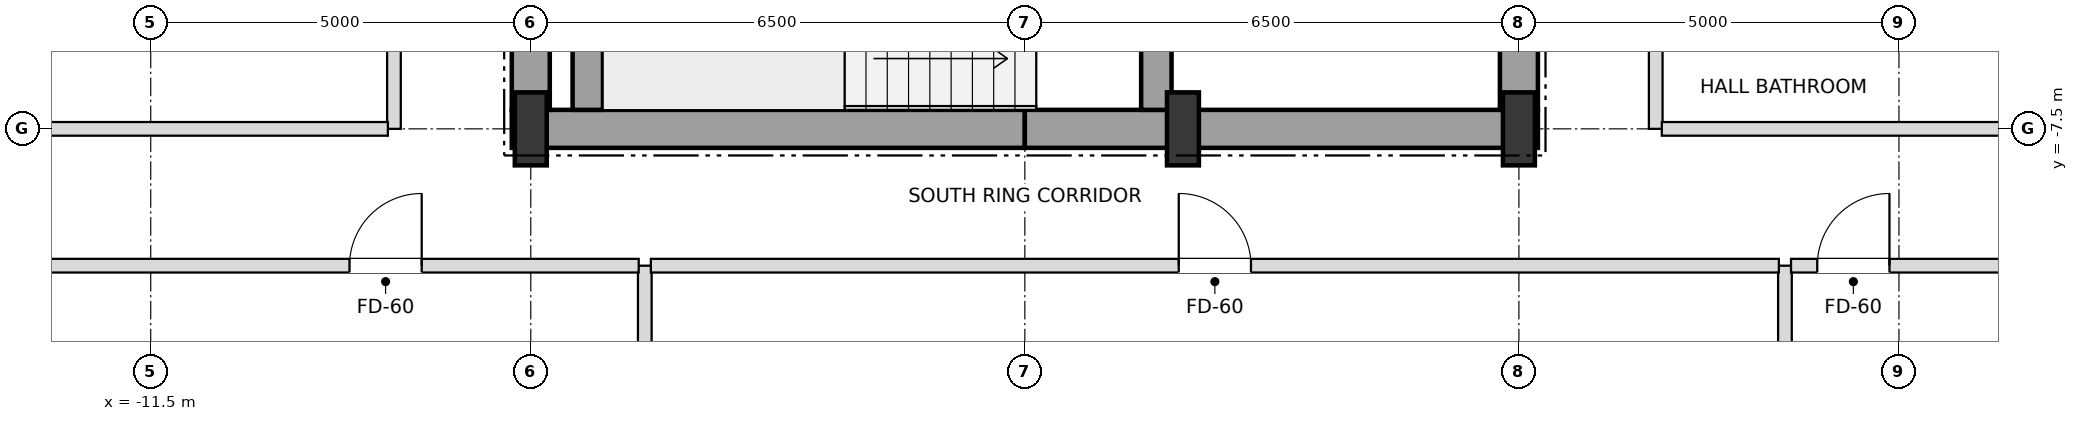
"""IFC4 building model, lengths in metres.
Left out: names, types, materials, properties, quantities, classifications, styles, units other than length and angle.
Written with IfcOpenShell. Run it as: python <this file> out.ifc"""

import sys

from ifc_helpers import new_model, si_unit, direction, frame, frame_2d, origin, origin_2d, place, context, subcontext, project, spatial, rectangle, i_section, extrude, element, fill, save


model = new_model("IFC4")
c1 = context("Model", 3, precision=1e-05, world=origin(), true_north=direction((0.0, 1.0)))
c2 = subcontext(c1, "Body", "Model", "MODEL_VIEW")
j1 = project(units=[si_unit("LENGTHUNIT", "METRE"), si_unit("PLANEANGLEUNIT", "RADIAN")], contexts=[c1])
p1 = place(None, origin())
s1 = spatial("IfcSite", under=j1, at=p1, CompositionType="ELEMENT")
p2 = place(p1, origin())
s2 = spatial("IfcBuilding", under=s1, at=p2, CompositionType="ELEMENT")
p3 = place(p2, frame((0.0, 0.0, 106.2)))
s3 = spatial("IfcBuildingStorey", under=s2, at=p3, CompositionType="ELEMENT", Elevation=106.2)
for number, where, z_axis, x_axis in (
    (1, (-6.5, -7.5, 0.0), (0.0, 0.0, 1.0), (1.0, 0.0, 0.0)),
    (2, (2.08, -7.5, 0.0), (0.0, 0.0, 1.0), (1.0, 0.0, 0.0)),
    (3, (6.5, -7.5, 0.0), (0.0, 0.0, 1.0), (1.0, 0.0, 0.0)),
):
    element("IfcColumn", number, at=place(p3, frame(where, z_axis=z_axis, x_axis=x_axis)), inside=s3, PredefinedType="COLUMN", context=c2, shape_type="SweptSolid", body=[
        extrude(i_section(OverallWidth=0.42, OverallDepth=0.96, WebThickness=0.022, FlangeThickness=0.034, at=origin_2d()), origin(), (0.0, 0.0, 1.0), 3.6),
    ])
for number, where, z_axis, x_axis in (
    (4, (-6.75, -7.5, 0.0), (0.0, 0.0, 1.0), (1.0, 0.0, 0.0)),
    (5, (0.0, -7.5, 0.0), (0.0, 0.0, 1.0), (1.0, 0.0, 0.0)),
):
    element("IfcWall", number, at=place(p3, frame(where, z_axis=z_axis, x_axis=x_axis)), inside=s3, PredefinedType="SHEAR", context=c2, shape_type="SweptSolid", body=[
        extrude(rectangle(XDim=6.75, YDim=0.5, at=frame_2d((3.375, 0.0))), origin(), (0.0, 0.0, 1.0), 3.38),
    ])
p4 = place(p3, frame((-6.5, -7.25, 0.0), z_axis=(0.0, 0.0, 1.0), x_axis=(0.0, 1.0, 0.0)))
e6 = element("IfcWall", 6, at=p4, inside=s3, PredefinedType="SHEAR", context=c2, shape_type="SweptSolid", body=[
    extrude(rectangle(XDim=3.55, YDim=0.5, at=frame_2d((1.775, 0.0))), origin(), (0.0, 0.0, 1.0), 3.38),
])
p5 = place(p3, frame((6.5, -7.25, 0.0), z_axis=(0.0, 0.0, 1.0), x_axis=(0.0, 1.0, 0.0)))
e7 = element("IfcWall", 7, at=p5, inside=s3, PredefinedType="SHEAR", context=c2, shape_type="SweptSolid", body=[
    extrude(rectangle(XDim=5.75, YDim=0.5, at=frame_2d((2.875, 0.0))), origin(), (0.0, 0.0, 1.0), 3.38),
])
p6 = place(p5, frame((0.85, 0.0, 0.0)))
e8 = element("IfcOpeningElement", 8, at=p6, cuts=e7, PredefinedType="OPENING", context=c2, shape_type="SweptSolid", body=[
    extrude(rectangle(XDim=1.05, YDim=2.15, at=frame_2d((0.525, 1.075))), frame((0.0, 0.26, 0.0), z_axis=(0.0, -1.0, 0.0), x_axis=(1.0, 0.0, 0.0)), (0.0, 0.0, 1.0), 0.52),
])
p7 = place(p3, frame((-5.75, -7.25, 0.0), z_axis=(0.0, 0.0, 1.0), x_axis=(0.0, 1.0, 0.0)))
e9 = element("IfcWall", 9, at=p7, inside=s3, PredefinedType="SHEAR", context=c2, shape_type="SweptSolid", body=[
    extrude(rectangle(XDim=2.9, YDim=0.4, at=frame_2d((1.45, 0.0))), origin(), (0.0, 0.0, 1.0), 3.38),
])
p8 = place(p3, frame((1.73, -7.25, 0.0), z_axis=(0.0, 0.0, 1.0), x_axis=(0.0, 1.0, 0.0)))
e10 = element("IfcWall", 10, at=p8, inside=s3, PredefinedType="SHEAR", context=c2, shape_type="SweptSolid", body=[
    extrude(rectangle(XDim=3.3, YDim=0.4, at=frame_2d((1.65, 0.0))), origin(), (0.0, 0.0, 1.0), 3.38),
])
p9 = place(p8, frame((0.9, 0.0, 0.0)))
e11 = element("IfcOpeningElement", 11, at=p9, cuts=e10, PredefinedType="OPENING", context=c2, shape_type="SweptSolid", body=[
    extrude(rectangle(XDim=1.05, YDim=2.15, at=frame_2d((0.525, 1.075))), frame((0.0, 0.21, 0.0), z_axis=(0.0, -1.0, 0.0), x_axis=(1.0, 0.0, 0.0)), (0.0, 0.0, 1.0), 0.42),
])
p10 = place(p3, frame((-8.3, -7.5, 0.0), z_axis=(0.0, 0.0, 1.0), x_axis=(0.0, 1.0, 0.0)))
e12 = element("IfcWall", 12, at=p10, inside=s3, PredefinedType="PARTITIONING", context=c2, shape_type="SweptSolid", body=[
    extrude(rectangle(XDim=15.0, YDim=0.18, at=frame_2d((7.5, 0.0))), origin(), (0.0, 0.0, 1.0), 3.38),
])
p11 = place(p10, frame((2.075, 0.0, 0.0)))
e13 = element("IfcOpeningElement", 13, at=p11, cuts=e12, PredefinedType="OPENING", context=c2, shape_type="SweptSolid", body=[
    extrude(rectangle(XDim=0.95, YDim=2.15, at=frame_2d((0.475, 1.075))), frame((0.0, 0.1, 0.0), z_axis=(0.0, -1.0, 0.0), x_axis=(1.0, 0.0, 0.0)), (0.0, 0.0, 1.0), 0.2),
])
p12 = place(p10, frame((8.475, 0.0, 0.0)))
e14 = element("IfcOpeningElement", 14, at=p12, cuts=e12, PredefinedType="OPENING", context=c2, shape_type="SweptSolid", body=[
    extrude(rectangle(XDim=0.95, YDim=2.15, at=frame_2d((0.475, 1.075))), frame((0.0, 0.1, 0.0), z_axis=(0.0, -1.0, 0.0), x_axis=(1.0, 0.0, 0.0)), (0.0, 0.0, 1.0), 0.2),
])
p13 = place(p10, frame((13.425, 0.0, 0.0)))
e15 = element("IfcOpeningElement", 15, at=p13, cuts=e12, PredefinedType="OPENING", context=c2, shape_type="SweptSolid", body=[
    extrude(rectangle(XDim=0.95, YDim=2.15, at=frame_2d((0.475, 1.075))), frame((0.0, 0.1, 0.0), z_axis=(0.0, -1.0, 0.0), x_axis=(1.0, 0.0, 0.0)), (0.0, 0.0, 1.0), 0.2),
])
p14 = place(p3, frame((-5.0, -23.15, 0.0), z_axis=(0.0, 0.0, 1.0), x_axis=(0.0, 1.0, 0.0)))
e16 = element("IfcWall", 16, at=p14, inside=s3, PredefinedType="PARTITIONING", context=c2, shape_type="SweptSolid", body=[
    extrude(rectangle(XDim=13.85, YDim=0.18, at=frame_2d((6.925, 0.0))), origin(), (0.0, 0.0, 1.0), 2.816),
])
p15 = place(p3, frame((8.3, -7.5, 0.0), z_axis=(0.0, 0.0, 1.0), x_axis=(0.0, 1.0, 0.0)))
e17 = element("IfcWall", 17, at=p15, inside=s3, PredefinedType="PARTITIONING", context=c2, shape_type="SweptSolid", body=[
    extrude(rectangle(XDim=15.0, YDim=0.18, at=frame_2d((7.5, 0.0))), origin(), (0.0, 0.0, 1.0), 3.38),
])
p16 = place(p15, frame((3.475, 0.0, 0.0)))
e18 = element("IfcOpeningElement", 18, at=p16, cuts=e17, PredefinedType="OPENING", context=c2, shape_type="SweptSolid", body=[
    extrude(rectangle(XDim=0.95, YDim=2.15, at=frame_2d((0.475, 1.075))), frame((0.0, 0.1, 0.0), z_axis=(0.0, -1.0, 0.0), x_axis=(1.0, 0.0, 0.0)), (0.0, 0.0, 1.0), 0.2),
])
p17 = place(p3, frame((10.0, -23.15, 0.0), z_axis=(0.0, 0.0, 1.0), x_axis=(0.0, 1.0, 0.0)))
e19 = element("IfcWall", 19, at=p17, inside=s3, PredefinedType="PARTITIONING", context=c2, shape_type="SweptSolid", body=[
    extrude(rectangle(XDim=13.85, YDim=0.18, at=frame_2d((6.925, 0.0))), origin(), (0.0, 0.0, 1.0), 2.816),
])
p18 = place(p17, frame((4.855, 0.0, 0.0)))
e20 = element("IfcOpeningElement", 20, at=p18, cuts=e19, PredefinedType="OPENING", context=c2, shape_type="SweptSolid", body=[
    extrude(rectangle(XDim=0.95, YDim=2.15, at=frame_2d((0.475, 1.075))), frame((0.0, 0.1, 0.0), z_axis=(0.0, -1.0, 0.0), x_axis=(1.0, 0.0, 0.0)), (0.0, 0.0, 1.0), 0.2),
])
p19 = place(p3, frame((-15.65, -9.3, 0.0), z_axis=(0.0, 0.0, 1.0), x_axis=(1.0, 0.0, 0.0)))
e21 = element("IfcWall", 21, at=p19, inside=s3, PredefinedType="PARTITIONING", context=c2, shape_type="SweptSolid", body=[
    extrude(rectangle(XDim=10.57, YDim=0.18, at=frame_2d((5.285, 0.0))), origin(), (0.0, 0.0, 1.0), 2.816),
])
p20 = place(p19, frame((6.765, 0.0, 0.0)))
e22 = element("IfcOpeningElement", 22, at=p20, cuts=e21, PredefinedType="OPENING", context=c2, shape_type="SweptSolid", body=[
    extrude(rectangle(XDim=0.95, YDim=2.15, at=frame_2d((0.475, 1.075))), frame((0.0, 0.1, 0.0), z_axis=(0.0, -1.0, 0.0), x_axis=(1.0, 0.0, 0.0)), (0.0, 0.0, 1.0), 0.2),
])
p21 = place(p3, frame((-4.92, -9.3, 0.0), z_axis=(0.0, 0.0, 1.0), x_axis=(1.0, 0.0, 0.0)))
e23 = element("IfcWall", 23, at=p21, inside=s3, PredefinedType="PARTITIONING", context=c2, shape_type="SweptSolid", body=[
    extrude(rectangle(XDim=14.84, YDim=0.18, at=frame_2d((7.42, 0.0))), origin(), (0.0, 0.0, 1.0), 2.816),
])
p22 = place(p21, frame((6.945, 0.0, 0.0)))
e24 = element("IfcOpeningElement", 24, at=p22, cuts=e23, PredefinedType="OPENING", context=c2, shape_type="SweptSolid", body=[
    extrude(rectangle(XDim=0.95, YDim=2.15, at=frame_2d((0.475, 1.075))), frame((0.0, 0.1, 0.0), z_axis=(0.0, -1.0, 0.0), x_axis=(1.0, 0.0, 0.0)), (0.0, 0.0, 1.0), 0.2),
])
p23 = place(p3, frame((10.08, -9.3, 0.0), z_axis=(0.0, 0.0, 1.0), x_axis=(1.0, 0.0, 0.0)))
e25 = element("IfcWall", 25, at=p23, inside=s3, PredefinedType="PARTITIONING", context=c2, shape_type="SweptSolid", body=[
    extrude(rectangle(XDim=5.49, YDim=0.18, at=frame_2d((2.745, 0.0))), origin(), (0.0, 0.0, 1.0), 3.38),
])
p24 = place(p23, frame((0.345, 0.0, 0.0)))
e26 = element("IfcOpeningElement", 26, at=p24, cuts=e25, PredefinedType="OPENING", context=c2, shape_type="SweptSolid", body=[
    extrude(rectangle(XDim=0.95, YDim=2.15, at=frame_2d((0.475, 1.075))), frame((0.0, 0.1, 0.0), z_axis=(0.0, -1.0, 0.0), x_axis=(1.0, 0.0, 0.0)), (0.0, 0.0, 1.0), 0.2),
])
p25 = place(p3, frame((-20.15, -7.5, 0.0), z_axis=(0.0, 0.0, 1.0), x_axis=(1.0, 0.0, 0.0)))
e27 = element("IfcWall", 27, at=p25, inside=s3, PredefinedType="PARTITIONING", context=c2, shape_type="SweptSolid", body=[
    extrude(rectangle(XDim=11.77, YDim=0.18, at=frame_2d((5.885, 0.0))), origin(), (0.0, 0.0, 1.0), 2.816),
])
p26 = place(p3, frame((8.38, -7.5, 0.0), z_axis=(0.0, 0.0, 1.0), x_axis=(1.0, 0.0, 0.0)))
e28 = element("IfcWall", 28, at=p26, inside=s3, PredefinedType="PARTITIONING", context=c2, shape_type="SweptSolid", body=[
    extrude(rectangle(XDim=5.89, YDim=0.18, at=frame_2d((2.945, 0.0))), origin(), (0.0, 0.0, 1.0), 2.816),
])
p27 = place(p24, origin())
e29 = element("IfcDoor", 29, at=p27, inside=s3, OperationType="SINGLE_SWING_RIGHT", PredefinedType="DOOR", context=c2, shape_type="SweptSolid", body=[
    extrude(rectangle(XDim=0.95, YDim=2.15, at=frame_2d((0.475, 1.075))), frame((0.0, 0.025, 0.0), z_axis=(0.0, -1.0, 0.0), x_axis=(1.0, 0.0, 0.0)), (0.0, 0.0, 1.0), 0.05),
])
fill(e26, e29)
p28 = place(p20, origin())
e30 = element("IfcDoor", 30, at=p28, inside=s3, OperationType="SINGLE_SWING_RIGHT", PredefinedType="DOOR", context=c2, shape_type="SweptSolid", body=[
    extrude(rectangle(XDim=0.95, YDim=2.15, at=frame_2d((0.475, 1.075))), frame((0.0, 0.025, 0.0), z_axis=(0.0, -1.0, 0.0), x_axis=(1.0, 0.0, 0.0)), (0.0, 0.0, 1.0), 0.05),
])
fill(e22, e30)
p29 = place(p22, origin())
e31 = element("IfcDoor", 31, at=p29, inside=s3, OperationType="SINGLE_SWING_LEFT", PredefinedType="DOOR", context=c2, shape_type="SweptSolid", body=[
    extrude(rectangle(XDim=0.95, YDim=2.15, at=frame_2d((0.475, 1.075))), frame((0.0, 0.025, 0.0), z_axis=(0.0, -1.0, 0.0), x_axis=(1.0, 0.0, 0.0)), (0.0, 0.0, 1.0), 0.05),
])
fill(e24, e31)
save(model, sys.argv[1])
